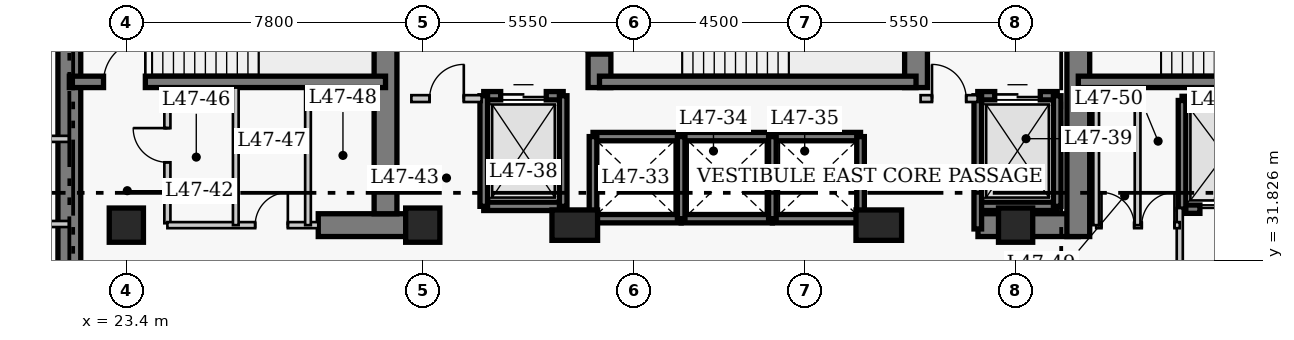
"""IFC4 building model, lengths in metres.
Left out: names, types, materials, properties, quantities, classifications, styles, units other than length and angle.
Written with IfcOpenShell. Run it as: python <this file> out.ifc"""

import sys

from ifc_helpers import new_model, si_unit, direction, frame, frame_2d, origin, origin_2d, place, context, subcontext, project, spatial, rectangle, extrude, element, fill, save


model = new_model("IFC4")
c1 = context("Model", 3, precision=1e-05, world=origin(), true_north=direction((0.0, 1.0)))
c2 = subcontext(c1, "Body", "Model", "MODEL_VIEW")
j1 = project(units=[si_unit("LENGTHUNIT", "METRE"), si_unit("PLANEANGLEUNIT", "RADIAN")], contexts=[c1])
p1 = place(None, origin())
s1 = spatial("IfcSite", under=j1, at=p1, CompositionType="ELEMENT")
p2 = place(p1, origin())
s2 = spatial("IfcBuilding", under=s1, at=p2, CompositionType="ELEMENT")
p3 = place(p2, frame((0.0, 0.0, 189.0)))
s3 = spatial("IfcBuildingStorey", under=s2, at=p3, CompositionType="ELEMENT", Elevation=189.0)
p4 = place(p3, frame((21.9, 27.05, 0.0), z_axis=(0.0, 0.0, 1.0), x_axis=(0.0, 1.0, 0.0)))
e1 = element("IfcWall", 1, at=p4, inside=s3, PredefinedType="SHEAR", context=c2, shape_type="SweptSolid", body=[
    extrude(rectangle(XDim=13.57, YDim=0.6, at=frame_2d((6.785, 0.0))), origin(), (0.0, 0.0, 1.0), 3.9),
])
p5 = place(p3, frame((28.45, 32.75, 0.0), z_axis=(0.0, 0.0, 1.0), x_axis=(1.0, 0.0, 0.0)))
e2 = element("IfcWall", 2, at=p5, inside=s3, PredefinedType="SHEAR", context=c2, shape_type="SweptSolid", body=[
    extrude(rectangle(XDim=2.4, YDim=0.6, at=frame_2d((1.2, 0.0))), origin(), (0.0, 0.0, 1.0), 3.9),
])
p6 = place(p3, frame((45.81, 32.75, 0.0), z_axis=(0.0, 0.0, 1.0), x_axis=(1.0, 0.0, 0.0)))
e3 = element("IfcWall", 3, at=p6, inside=s3, PredefinedType="SHEAR", context=c2, shape_type="SweptSolid", body=[
    extrude(rectangle(XDim=2.64, YDim=0.6, at=frame_2d((1.32, 0.0))), origin(), (0.0, 0.0, 1.0), 3.9),
])
p7 = place(p3, frame((30.22, 33.05, 0.0), z_axis=(0.0, 0.0, 1.0), x_axis=(0.0, 1.0, 0.0)))
e4 = element("IfcWall", 4, at=p7, inside=s3, PredefinedType="SHEAR", context=c2, shape_type="SweptSolid", body=[
    extrude(rectangle(XDim=7.27, YDim=0.6, at=frame_2d((3.635, 0.0))), origin(), (0.0, 0.0, 1.0), 3.9),
])
p8 = place(p3, frame((35.85, 36.37, 0.0), z_axis=(0.0, 0.0, 1.0), x_axis=(0.0, 1.0, 0.0)))
e5 = element("IfcWall", 5, at=p8, inside=s3, PredefinedType="SHEAR", context=c2, shape_type="SweptSolid", body=[
    extrude(rectangle(XDim=3.95, YDim=0.6, at=frame_2d((1.975, 0.0))), origin(), (0.0, 0.0, 1.0), 3.9),
])
p9 = place(p8, frame((0.88, 0.0, 0.0)))
e6 = element("IfcOpeningElement", 6, at=p9, cuts=e5, PredefinedType="OPENING", context=c2, shape_type="SweptSolid", body=[
    extrude(rectangle(XDim=1.1, YDim=2.15, at=frame_2d((0.55, 1.075))), frame((0.0, 0.31, 0.0), z_axis=(0.0, -1.0, 0.0), x_axis=(1.0, 0.0, 0.0)), (0.0, 0.0, 1.0), 0.62),
])
p10 = place(p3, frame((44.18, 36.37, 0.0), z_axis=(0.0, 0.0, 1.0), x_axis=(0.0, 1.0, 0.0)))
e7 = element("IfcWall", 7, at=p10, inside=s3, PredefinedType="SHEAR", context=c2, shape_type="SweptSolid", body=[
    extrude(rectangle(XDim=3.95, YDim=0.6, at=frame_2d((1.975, 0.0))), origin(), (0.0, 0.0, 1.0), 3.9),
])
p11 = place(p3, frame((48.45, 32.45, 0.0), z_axis=(0.0, 0.0, 1.0), x_axis=(0.0, 1.0, 0.0)))
e8 = element("IfcWall", 8, at=p11, inside=s3, PredefinedType="SHEAR", context=c2, shape_type="SweptSolid", body=[
    extrude(rectangle(XDim=7.87, YDim=0.6, at=frame_2d((3.935, 0.0))), origin(), (0.0, 0.0, 1.0), 3.9),
])
p12 = place(p11, frame((5.75, 0.0, 0.0)))
e9 = element("IfcOpeningElement", 9, at=p12, cuts=e8, PredefinedType="OPENING", context=c2, shape_type="SweptSolid", body=[
    extrude(rectangle(XDim=1.1, YDim=2.15, at=frame_2d((0.55, 1.075))), frame((0.0, 0.31, 0.0), z_axis=(0.0, -1.0, 0.0), x_axis=(1.0, 0.0, 0.0)), (0.0, 0.0, 1.0), 0.62),
])
p13 = place(p3, frame((21.9, 36.52, 0.0), z_axis=(0.0, 0.0, 1.0), x_axis=(1.0, 0.0, 0.0)))
e10 = element("IfcWall", 10, at=p13, inside=s3, PredefinedType="SHEAR", context=c2, shape_type="SweptSolid", body=[
    extrude(rectangle(XDim=8.32, YDim=0.3, at=frame_2d((4.16, 0.0))), origin(), (0.0, 0.0, 1.0), 3.9),
])
p14 = place(p13, frame((0.9, 0.0, 0.0)))
e11 = element("IfcOpeningElement", 11, at=p14, cuts=e10, PredefinedType="OPENING", context=c2, shape_type="SweptSolid", body=[
    extrude(rectangle(XDim=1.1, YDim=2.15, at=frame_2d((0.55, 1.075))), frame((0.0, 0.16, 0.0), z_axis=(0.0, -1.0, 0.0), x_axis=(1.0, 0.0, 0.0)), (0.0, 0.0, 1.0), 0.32),
])
p15 = place(p3, frame((35.85, 36.52, 0.0), z_axis=(0.0, 0.0, 1.0), x_axis=(1.0, 0.0, 0.0)))
e12 = element("IfcWall", 12, at=p15, inside=s3, PredefinedType="SHEAR", context=c2, shape_type="SweptSolid", body=[
    extrude(rectangle(XDim=8.33, YDim=0.3, at=frame_2d((4.165, 0.0))), origin(), (0.0, 0.0, 1.0), 3.9),
])
p16 = place(p3, frame((48.45, 36.52, 0.0), z_axis=(0.0, 0.0, 1.0), x_axis=(1.0, 0.0, 0.0)))
e13 = element("IfcWall", 13, at=p16, inside=s3, PredefinedType="SHEAR", context=c2, shape_type="SweptSolid", body=[
    extrude(rectangle(XDim=8.37, YDim=0.3, at=frame_2d((4.185, 0.0))), origin(), (0.0, 0.0, 1.0), 3.9),
])
for number, where, z_axis, x_axis in (
    (14, (23.4, 32.75, 0.0), (0.0, 0.0, 1.0), (1.0, 0.0, 0.0)),
    (15, (31.2, 32.75, 0.0), (0.0, 0.0, 1.0), (1.0, 0.0, 0.0)),
):
    element("IfcColumn", number, at=place(p3, frame(where, z_axis=z_axis, x_axis=x_axis)), inside=s3, PredefinedType="COLUMN", context=c2, shape_type="SweptSolid", body=[
        extrude(rectangle(XDim=0.9, YDim=0.9, at=origin_2d()), origin(), (0.0, 0.0, 1.0), 3.9),
    ])
for number, where, z_axis, x_axis in (
    (16, (35.2, 32.75, 0.0), (0.0, 0.0, 1.0), (1.0, 0.0, 0.0)),
    (17, (43.2, 32.75, 0.0), (0.0, 0.0, 1.0), (1.0, 0.0, 0.0)),
):
    element("IfcColumn", number, at=place(p3, frame(where, z_axis=z_axis, x_axis=x_axis)), inside=s3, PredefinedType="COLUMN", context=c2, shape_type="SweptSolid", body=[
        extrude(rectangle(XDim=1.2, YDim=0.8, at=origin_2d()), origin(), (0.0, 0.0, 1.0), 3.9),
    ])
p17 = place(p3, frame((46.8, 32.75, 0.0), z_axis=(0.0, 0.0, 1.0), x_axis=(1.0, 0.0, 0.0)))
e18 = element("IfcColumn", 18, at=p17, inside=s3, PredefinedType="COLUMN", context=c2, shape_type="SweptSolid", body=[
    extrude(rectangle(XDim=0.9, YDim=0.9, at=origin_2d()), origin(), (0.0, 0.0, 1.0), 3.9),
])
for number, where, z_axis, x_axis in (
    (19, (35.68, 35.08, 0.0), (0.0, 0.0, 1.0), (1.0, 0.0, 0.0)),
    (20, (35.68, 32.92, 0.0), (0.0, 0.0, 1.0), (1.0, 0.0, 0.0)),
):
    element("IfcWall", number, at=place(p3, frame(where, z_axis=z_axis, x_axis=x_axis)), inside=s3, PredefinedType="SHEAR", context=c2, shape_type="SweptSolid", body=[
        extrude(rectangle(XDim=2.32, YDim=0.22, at=frame_2d((1.16, 0.0))), origin(), (0.0, 0.0, 1.0), 3.9),
    ])
p18 = place(p3, frame((35.68, 32.92, 0.0), z_axis=(0.0, 0.0, 1.0), x_axis=(0.0, 1.0, 0.0)))
e21 = element("IfcWall", 21, at=p18, inside=s3, PredefinedType="SHEAR", context=c2, shape_type="SweptSolid", body=[
    extrude(rectangle(XDim=2.16, YDim=0.2, at=frame_2d((1.08, 0.0))), origin(), (0.0, 0.0, 1.0), 3.9),
])
for number, where, z_axis, x_axis in (
    (22, (38.0, 35.08, 0.0), (0.0, 0.0, 1.0), (1.0, 0.0, 0.0)),
    (23, (38.0, 32.92, 0.0), (0.0, 0.0, 1.0), (1.0, 0.0, 0.0)),
):
    element("IfcWall", number, at=place(p3, frame(where, z_axis=z_axis, x_axis=x_axis)), inside=s3, PredefinedType="SHEAR", context=c2, shape_type="SweptSolid", body=[
        extrude(rectangle(XDim=2.4, YDim=0.22, at=frame_2d((1.2, 0.0))), origin(), (0.0, 0.0, 1.0), 3.9),
    ])
p19 = place(p3, frame((38.0, 32.92, 0.0), z_axis=(0.0, 0.0, 1.0), x_axis=(0.0, 1.0, 0.0)))
e24 = element("IfcWall", 24, at=p19, inside=s3, PredefinedType="SHEAR", context=c2, shape_type="SweptSolid", body=[
    extrude(rectangle(XDim=2.16, YDim=0.2, at=frame_2d((1.08, 0.0))), origin(), (0.0, 0.0, 1.0), 3.9),
])
for number, where, z_axis, x_axis in (
    (25, (40.4, 35.08, 0.0), (0.0, 0.0, 1.0), (1.0, 0.0, 0.0)),
    (26, (40.4, 32.92, 0.0), (0.0, 0.0, 1.0), (1.0, 0.0, 0.0)),
):
    element("IfcWall", number, at=place(p3, frame(where, z_axis=z_axis, x_axis=x_axis)), inside=s3, PredefinedType="SHEAR", context=c2, shape_type="SweptSolid", body=[
        extrude(rectangle(XDim=2.32, YDim=0.22, at=frame_2d((1.16, 0.0))), origin(), (0.0, 0.0, 1.0), 3.9),
    ])
for number, where, z_axis, x_axis in (
    (27, (40.4, 32.92, 0.0), (0.0, 0.0, 1.0), (0.0, 1.0, 0.0)),
    (28, (42.72, 32.92, 0.0), (0.0, 0.0, 1.0), (0.0, 1.0, 0.0)),
):
    element("IfcWall", number, at=place(p3, frame(where, z_axis=z_axis, x_axis=x_axis)), inside=s3, PredefinedType="SHEAR", context=c2, shape_type="SweptSolid", body=[
        extrude(rectangle(XDim=2.16, YDim=0.2, at=frame_2d((1.08, 0.0))), origin(), (0.0, 0.0, 1.0), 3.9),
    ])
p20 = place(p3, frame((51.18, 36.03, 0.0), z_axis=(0.0, 0.0, 1.0), x_axis=(1.0, 0.0, 0.0)))
e29 = element("IfcWall", 29, at=p20, inside=s3, PredefinedType="SHEAR", context=c2, shape_type="SweptSolid", body=[
    extrude(rectangle(XDim=2.42, YDim=0.22, at=frame_2d((1.21, 0.0))), origin(), (0.0, 0.0, 1.0), 3.9),
])
p21 = place(p3, frame((51.18, 33.17, 0.0), z_axis=(0.0, 0.0, 1.0), x_axis=(1.0, 0.0, 0.0)))
e30 = element("IfcWall", 30, at=p21, inside=s3, PredefinedType="SHEAR", context=c2, shape_type="SweptSolid", body=[
    extrude(rectangle(XDim=2.42, YDim=0.22, at=frame_2d((1.21, 0.0))), origin(), (0.0, 0.0, 1.0), 3.9),
])
p22 = place(p21, frame((0.47, 0.0, 0.0)))
e31 = element("IfcOpeningElement", 31, at=p22, cuts=e30, PredefinedType="OPENING", context=c2, shape_type="SweptSolid", body=[
    extrude(rectangle(XDim=1.3, YDim=2.15, at=frame_2d((0.65, 1.075))), frame((0.0, 0.12, 0.0), z_axis=(0.0, -1.0, 0.0), x_axis=(1.0, 0.0, 0.0)), (0.0, 0.0, 1.0), 0.24),
])
p23 = place(p3, frame((51.18, 33.17, 0.0), z_axis=(0.0, 0.0, 1.0), x_axis=(0.0, 1.0, 0.0)))
e32 = element("IfcWall", 32, at=p23, inside=s3, PredefinedType="SHEAR", context=c2, shape_type="SweptSolid", body=[
    extrude(rectangle(XDim=2.86, YDim=0.2, at=frame_2d((1.43, 0.0))), origin(), (0.0, 0.0, 1.0), 3.9),
])
p24 = place(p3, frame((32.805, 36.155, 0.0), z_axis=(0.0, 0.0, 1.0), x_axis=(1.0, 0.0, 0.0)))
e33 = element("IfcWall", 33, at=p24, inside=s3, PredefinedType="SHEAR", context=c2, shape_type="SweptSolid", body=[
    extrude(rectangle(XDim=2.09, YDim=0.22, at=frame_2d((1.045, 0.0))), origin(), (0.0, 0.0, 1.0), 3.9),
])
p25 = place(p24, frame((0.445, 0.0, 0.0)))
e34 = element("IfcOpeningElement", 34, at=p25, cuts=e33, PredefinedType="OPENING", context=c2, shape_type="SweptSolid", body=[
    extrude(rectangle(XDim=1.2, YDim=2.15, at=frame_2d((0.6, 1.075))), frame((0.0, 0.12, 0.0), z_axis=(0.0, -1.0, 0.0), x_axis=(1.0, 0.0, 0.0)), (0.0, 0.0, 1.0), 0.24),
])
p26 = place(p3, frame((32.805, 33.245, 0.0), z_axis=(0.0, 0.0, 1.0), x_axis=(1.0, 0.0, 0.0)))
e35 = element("IfcWall", 35, at=p26, inside=s3, PredefinedType="SHEAR", context=c2, shape_type="SweptSolid", body=[
    extrude(rectangle(XDim=2.09, YDim=0.22, at=frame_2d((1.045, 0.0))), origin(), (0.0, 0.0, 1.0), 3.9),
])
for number, where, z_axis, x_axis in (
    (36, (32.805, 33.245, 0.0), (0.0, 0.0, 1.0), (0.0, 1.0, 0.0)),
    (37, (34.895, 33.245, 0.0), (0.0, 0.0, 1.0), (0.0, 1.0, 0.0)),
):
    element("IfcWall", number, at=place(p3, frame(where, z_axis=z_axis, x_axis=x_axis)), inside=s3, PredefinedType="SHEAR", context=c2, shape_type="SweptSolid", body=[
        extrude(rectangle(XDim=2.91, YDim=0.2, at=frame_2d((1.455, 0.0))), origin(), (0.0, 0.0, 1.0), 3.9),
    ])
p27 = place(p3, frame((45.805, 36.155, 0.0), z_axis=(0.0, 0.0, 1.0), x_axis=(1.0, 0.0, 0.0)))
e38 = element("IfcWall", 38, at=p27, inside=s3, PredefinedType="SHEAR", context=c2, shape_type="SweptSolid", body=[
    extrude(rectangle(XDim=2.09, YDim=0.22, at=frame_2d((1.045, 0.0))), origin(), (0.0, 0.0, 1.0), 3.9),
])
p28 = place(p27, frame((0.445, 0.0, 0.0)))
e39 = element("IfcOpeningElement", 39, at=p28, cuts=e38, PredefinedType="OPENING", context=c2, shape_type="SweptSolid", body=[
    extrude(rectangle(XDim=1.2, YDim=2.15, at=frame_2d((0.6, 1.075))), frame((0.0, 0.12, 0.0), z_axis=(0.0, -1.0, 0.0), x_axis=(1.0, 0.0, 0.0)), (0.0, 0.0, 1.0), 0.24),
])
p29 = place(p3, frame((45.805, 33.245, 0.0), z_axis=(0.0, 0.0, 1.0), x_axis=(1.0, 0.0, 0.0)))
e40 = element("IfcWall", 40, at=p29, inside=s3, PredefinedType="SHEAR", context=c2, shape_type="SweptSolid", body=[
    extrude(rectangle(XDim=2.09, YDim=0.22, at=frame_2d((1.045, 0.0))), origin(), (0.0, 0.0, 1.0), 3.9),
])
p30 = place(p3, frame((45.805, 32.65, 0.0), z_axis=(0.0, 0.0, 1.0), x_axis=(0.0, 1.0, 0.0)))
e41 = element("IfcWall", 41, at=p30, inside=s3, PredefinedType="SHEAR", context=c2, shape_type="SweptSolid", body=[
    extrude(rectangle(XDim=3.505, YDim=0.2, at=frame_2d((1.752, 0.0))), origin(), (0.0, 0.0, 1.0), 3.9),
])
p31 = place(p3, frame((47.895, 33.245, 0.0), z_axis=(0.0, 0.0, 1.0), x_axis=(0.0, 1.0, 0.0)))
e42 = element("IfcWall", 42, at=p31, inside=s3, PredefinedType="SHEAR", context=c2, shape_type="SweptSolid", body=[
    extrude(rectangle(XDim=2.91, YDim=0.2, at=frame_2d((1.455, 0.0))), origin(), (0.0, 0.0, 1.0), 3.9),
])
p32 = place(p3, frame((30.9, 36.08, 0.0), z_axis=(0.0, 0.0, 1.0), x_axis=(1.0, 0.0, 0.0)))
e43 = element("IfcWall", 43, at=p32, inside=s3, PredefinedType="PARTITIONING", context=c2, shape_type="SweptSolid", body=[
    extrude(rectangle(XDim=1.85, YDim=0.18, at=frame_2d((0.925, 0.0))), origin(), (0.0, 0.0, 1.0), 3.65),
])
p33 = place(p32, frame((0.48, 0.0, 0.0)))
e44 = element("IfcOpeningElement", 44, at=p33, cuts=e43, PredefinedType="OPENING", context=c2, shape_type="SweptSolid", body=[
    extrude(rectangle(XDim=0.9, YDim=2.15, at=frame_2d((0.45, 1.075))), frame((0.0, 0.1, 0.0), z_axis=(0.0, -1.0, 0.0), x_axis=(1.0, 0.0, 0.0)), (0.0, 0.0, 1.0), 0.2),
])
p34 = place(p3, frame((44.3, 36.08, 0.0), z_axis=(0.0, 0.0, 1.0), x_axis=(1.0, 0.0, 0.0)))
e45 = element("IfcWall", 45, at=p34, inside=s3, PredefinedType="PARTITIONING", context=c2, shape_type="SweptSolid", body=[
    extrude(rectangle(XDim=1.5, YDim=0.18, at=frame_2d((0.75, 0.0))), origin(), (0.0, 0.0, 1.0), 3.65),
])
p35 = place(p34, frame((0.3, 0.0, 0.0)))
e46 = element("IfcOpeningElement", 46, at=p35, cuts=e45, PredefinedType="OPENING", context=c2, shape_type="SweptSolid", body=[
    extrude(rectangle(XDim=0.9, YDim=2.15, at=frame_2d((0.45, 1.075))), frame((0.0, 0.1, 0.0), z_axis=(0.0, -1.0, 0.0), x_axis=(1.0, 0.0, 0.0)), (0.0, 0.0, 1.0), 0.2),
])
p36 = place(p3, frame((24.48, 32.8, 0.0), z_axis=(0.0, 0.0, 1.0), x_axis=(0.0, 1.0, 0.0)))
e47 = element("IfcWall", 47, at=p36, inside=s3, PredefinedType="PARTITIONING", context=c2, shape_type="SweptSolid", body=[
    extrude(rectangle(XDim=3.57, YDim=0.16, at=frame_2d((1.785, 0.0))), origin(), (0.0, 0.0, 1.0), 3.65),
])
p37 = place(p36, frame((1.604, 0.0, 0.0)))
e48 = element("IfcOpeningElement", 48, at=p37, cuts=e47, PredefinedType="OPENING", context=c2, shape_type="SweptSolid", body=[
    extrude(rectangle(XDim=0.9, YDim=2.1, at=frame_2d((0.45, 1.05))), frame((0.0, 0.09, 0.0), z_axis=(0.0, -1.0, 0.0), x_axis=(1.0, 0.0, 0.0)), (0.0, 0.0, 1.0), 0.18),
])
p38 = place(p3, frame((51.12, 29.5, 0.0), z_axis=(0.0, 0.0, 1.0), x_axis=(0.0, 1.0, 0.0)))
e49 = element("IfcWall", 49, at=p38, inside=s3, PredefinedType="PARTITIONING", context=c2, shape_type="SweptSolid", body=[
    extrude(rectangle(XDim=3.7, YDim=0.16, at=frame_2d((1.85, 0.0))), origin(), (0.0, 0.0, 1.0), 3.65),
])
p39 = place(p38, frame((0.9, 0.0, 0.0)))
e50 = element("IfcOpeningElement", 50, at=p39, cuts=e49, PredefinedType="OPENING", context=c2, shape_type="SweptSolid", body=[
    extrude(rectangle(XDim=1.1, YDim=2.15, at=frame_2d((0.55, 1.075))), frame((0.0, 0.09, 0.0), z_axis=(0.0, -1.0, 0.0), x_axis=(1.0, 0.0, 0.0)), (0.0, 0.0, 1.0), 0.18),
])
p40 = place(p3, frame((24.48, 32.75, 0.0), z_axis=(0.0, 0.0, 1.0), x_axis=(1.0, 0.0, 0.0)))
e51 = element("IfcWall", 51, at=p40, inside=s3, PredefinedType="PARTITIONING", context=c2, shape_type="SweptSolid", body=[
    extrude(rectangle(XDim=3.97, YDim=0.16, at=frame_2d((1.985, 0.0))), origin(), (0.0, 0.0, 1.0), 3.65),
])
p41 = place(p40, frame((2.31, 0.0, 0.0)))
e52 = element("IfcOpeningElement", 52, at=p41, cuts=e51, PredefinedType="OPENING", context=c2, shape_type="SweptSolid", body=[
    extrude(rectangle(XDim=0.86, YDim=2.05, at=frame_2d((0.43, 1.025))), frame((0.0, 0.09, 0.0), z_axis=(0.0, -1.0, 0.0), x_axis=(1.0, 0.0, 0.0)), (0.0, 0.0, 1.0), 0.18),
])
p42 = place(p3, frame((48.92, 32.75, 0.0), z_axis=(0.0, 0.0, 1.0), x_axis=(1.0, 0.0, 0.0)))
e53 = element("IfcWall", 53, at=p42, inside=s3, PredefinedType="PARTITIONING", context=c2, shape_type="SweptSolid", body=[
    extrude(rectangle(XDim=2.2, YDim=0.16, at=frame_2d((1.1, 0.0))), origin(), (0.0, 0.0, 1.0), 3.65),
])
p43 = place(p42, frame((0.14, 0.0, 0.0)))
e54 = element("IfcOpeningElement", 54, at=p43, cuts=e53, PredefinedType="OPENING", context=c2, shape_type="SweptSolid", body=[
    extrude(rectangle(XDim=0.86, YDim=2.05, at=frame_2d((0.43, 1.025))), frame((0.0, 0.09, 0.0), z_axis=(0.0, -1.0, 0.0), x_axis=(1.0, 0.0, 0.0)), (0.0, 0.0, 1.0), 0.18),
])
p44 = place(p42, frame((1.2, 0.0, 0.0)))
e55 = element("IfcOpeningElement", 55, at=p44, cuts=e53, PredefinedType="OPENING", context=c2, shape_type="SweptSolid", body=[
    extrude(rectangle(XDim=0.86, YDim=2.05, at=frame_2d((0.43, 1.025))), frame((0.0, 0.09, 0.0), z_axis=(0.0, -1.0, 0.0), x_axis=(1.0, 0.0, 0.0)), (0.0, 0.0, 1.0), 0.18),
])
for number, where, z_axis, x_axis in (
    (56, (48.92, 32.75, 0.0), (0.0, 0.0, 1.0), (0.0, 1.0, 0.0)),
    (57, (26.28, 32.75, 0.0), (0.0, 0.0, 1.0), (0.0, 1.0, 0.0)),
    (58, (28.18, 32.75, 0.0), (0.0, 0.0, 1.0), (0.0, 1.0, 0.0)),
    (59, (50.01, 32.75, 0.0), (0.0, 0.0, 1.0), (0.0, 1.0, 0.0)),
):
    element("IfcWall", number, at=place(p3, frame(where, z_axis=z_axis, x_axis=x_axis)), inside=s3, PredefinedType="PARTITIONING", context=c2, shape_type="SweptSolid", body=[
        extrude(rectangle(XDim=3.62, YDim=0.15, at=frame_2d((1.81, 0.0))), origin(), (0.0, 0.0, 1.0), 3.65),
    ])
for number, where, z_axis, x_axis in (
    (60, (20.46, 35.02, 0.0), (0.0, 0.0, 1.0), (1.0, 0.0, 0.0)),
    (61, (20.46, 32.78, 0.0), (0.0, 0.0, 1.0), (1.0, 0.0, 0.0)),
):
    element("IfcWall", number, at=place(p3, frame(where, z_axis=z_axis, x_axis=x_axis)), inside=s3, PredefinedType="PARTITIONING", context=c2, shape_type="SweptSolid", body=[
        extrude(rectangle(XDim=1.44, YDim=0.16, at=frame_2d((0.72, 0.0))), origin(), (0.0, 0.0, 1.0), 3.65),
    ])
p45 = place(p22, origin())
e62 = element("IfcDoor", 62, at=p45, inside=s3, OperationType="DOUBLE_DOOR_SLIDING", PredefinedType="DOOR", context=c2, shape_type="SweptSolid", body=[
    extrude(rectangle(XDim=1.3, YDim=2.15, at=frame_2d((0.65, 1.075))), frame((0.0, 0.025, 0.0), z_axis=(0.0, -1.0, 0.0), x_axis=(1.0, 0.0, 0.0)), (0.0, 0.0, 1.0), 0.05),
])
fill(e31, e62)
p46 = place(p25, origin())
e63 = element("IfcDoor", 63, at=p46, inside=s3, OperationType="DOUBLE_DOOR_SLIDING", PredefinedType="DOOR", context=c2, shape_type="SweptSolid", body=[
    extrude(rectangle(XDim=1.2, YDim=2.15, at=frame_2d((0.6, 1.075))), frame((0.0, 0.025, 0.0), z_axis=(0.0, -1.0, 0.0), x_axis=(1.0, 0.0, 0.0)), (0.0, 0.0, 1.0), 0.05),
])
fill(e34, e63)
p47 = place(p28, origin())
e64 = element("IfcDoor", 64, at=p47, inside=s3, OperationType="DOUBLE_DOOR_SLIDING", PredefinedType="DOOR", context=c2, shape_type="SweptSolid", body=[
    extrude(rectangle(XDim=1.2, YDim=2.15, at=frame_2d((0.6, 1.075))), frame((0.0, 0.025, 0.0), z_axis=(0.0, -1.0, 0.0), x_axis=(1.0, 0.0, 0.0)), (0.0, 0.0, 1.0), 0.05),
])
fill(e39, e64)
p48 = place(p33, origin())
e65 = element("IfcDoor", 65, at=p48, inside=s3, OperationType="SINGLE_SWING_RIGHT", PredefinedType="DOOR", context=c2, shape_type="SweptSolid", body=[
    extrude(rectangle(XDim=0.9, YDim=2.15, at=frame_2d((0.45, 1.075))), frame((0.0, 0.025, 0.0), z_axis=(0.0, -1.0, 0.0), x_axis=(1.0, 0.0, 0.0)), (0.0, 0.0, 1.0), 0.05),
])
fill(e44, e65)
p49 = place(p35, origin())
e66 = element("IfcDoor", 66, at=p49, inside=s3, OperationType="SINGLE_SWING_LEFT", PredefinedType="DOOR", context=c2, shape_type="SweptSolid", body=[
    extrude(rectangle(XDim=0.9, YDim=2.15, at=frame_2d((0.45, 1.075))), frame((0.0, 0.025, 0.0), z_axis=(0.0, -1.0, 0.0), x_axis=(1.0, 0.0, 0.0)), (0.0, 0.0, 1.0), 0.05),
])
fill(e46, e66)
p50 = place(p37, origin())
e67 = element("IfcDoor", 67, at=p50, inside=s3, OperationType="SINGLE_SWING_RIGHT", PredefinedType="DOOR", context=c2, shape_type="SweptSolid", body=[
    extrude(rectangle(XDim=0.9, YDim=2.1, at=frame_2d((0.45, 1.05))), frame((0.0, 0.025, 0.0), z_axis=(0.0, -1.0, 0.0), x_axis=(1.0, 0.0, 0.0)), (0.0, 0.0, 1.0), 0.05),
])
fill(e48, e67)
p51 = place(p41, origin())
e68 = element("IfcDoor", 68, at=p51, inside=s3, OperationType="SINGLE_SWING_RIGHT", PredefinedType="DOOR", context=c2, shape_type="SweptSolid", body=[
    extrude(rectangle(XDim=0.86, YDim=2.05, at=frame_2d((0.43, 1.025))), frame((0.0, 0.025, 0.0), z_axis=(0.0, -1.0, 0.0), x_axis=(1.0, 0.0, 0.0)), (0.0, 0.0, 1.0), 0.05),
])
fill(e52, e68)
p52 = place(p43, origin())
e69 = element("IfcDoor", 69, at=p52, inside=s3, OperationType="SINGLE_SWING_LEFT", PredefinedType="DOOR", context=c2, shape_type="SweptSolid", body=[
    extrude(rectangle(XDim=0.86, YDim=2.05, at=frame_2d((0.43, 1.025))), frame((0.0, 0.025, 0.0), z_axis=(0.0, -1.0, 0.0), x_axis=(1.0, 0.0, 0.0)), (0.0, 0.0, 1.0), 0.05),
])
fill(e54, e69)
p53 = place(p44, origin())
e70 = element("IfcDoor", 70, at=p53, inside=s3, OperationType="SINGLE_SWING_RIGHT", PredefinedType="DOOR", context=c2, shape_type="SweptSolid", body=[
    extrude(rectangle(XDim=0.86, YDim=2.05, at=frame_2d((0.43, 1.025))), frame((0.0, 0.025, 0.0), z_axis=(0.0, -1.0, 0.0), x_axis=(1.0, 0.0, 0.0)), (0.0, 0.0, 1.0), 0.05),
])
fill(e55, e70)
p54 = place(p14, origin())
e71 = element("IfcDoor", 71, at=p54, inside=s3, OperationType="SINGLE_SWING_RIGHT", PredefinedType="DOOR", context=c2, shape_type="SweptSolid", body=[
    extrude(rectangle(XDim=1.1, YDim=2.15, at=frame_2d((0.55, 1.075))), frame((0.0, 0.025, 0.0), z_axis=(0.0, -1.0, 0.0), x_axis=(1.0, 0.0, 0.0)), (0.0, 0.0, 1.0), 0.05),
])
fill(e11, e71)
p55 = place(p9, origin())
e72 = element("IfcDoor", 72, at=p55, inside=s3, OperationType="SINGLE_SWING_RIGHT", PredefinedType="DOOR", context=c2, shape_type="SweptSolid", body=[
    extrude(rectangle(XDim=1.1, YDim=2.15, at=frame_2d((0.55, 1.075))), frame((0.0, 0.025, 0.0), z_axis=(0.0, -1.0, 0.0), x_axis=(1.0, 0.0, 0.0)), (0.0, 0.0, 1.0), 0.05),
])
fill(e6, e72)
save(model, sys.argv[1])
